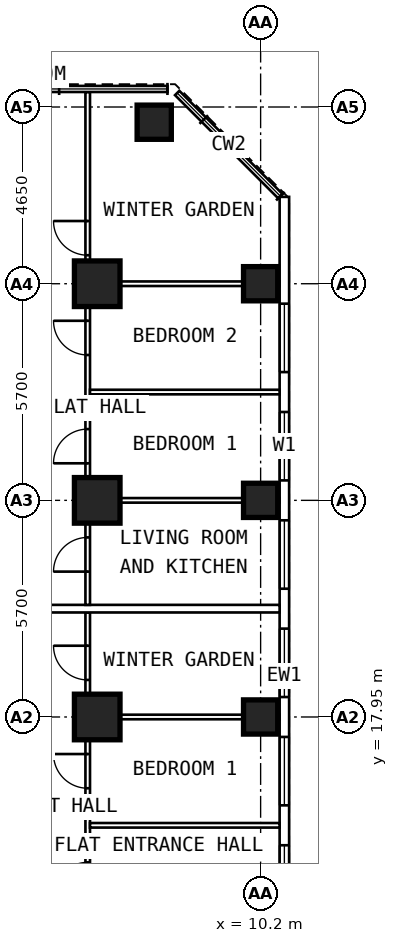
"""IFC4 building model, lengths in metres.
Left out: names, types, materials, properties, quantities, classifications, styles, units other than length and angle.
Written with IfcOpenShell. Run it as: python <this file> out.ifc"""

import sys

from ifc_helpers import new_model, si_unit, direction, frame, frame_2d, origin, origin_2d, place, context, subcontext, project, spatial, rectangle, extrude, element, fill, save


model = new_model("IFC4")
c1 = context("Model", 3, precision=1e-05, world=origin(), true_north=direction((0.0, 1.0)))
c2 = subcontext(c1, "Body", "Model", "MODEL_VIEW")
j1 = project(units=[si_unit("LENGTHUNIT", "METRE"), si_unit("PLANEANGLEUNIT", "RADIAN")], contexts=[c1])
p1 = place(None, origin())
s1 = spatial("IfcSite", under=j1, at=p1, CompositionType="ELEMENT")
p2 = place(p1, origin())
s2 = spatial("IfcBuilding", under=s1, at=p2, CompositionType="ELEMENT")
p3 = place(p2, frame((0.0, 0.0, 80.8)))
s3 = spatial("IfcBuildingStorey", under=s2, at=p3, CompositionType="ELEMENT", Elevation=80.8)
for number, where, z_axis, x_axis in (
    (1, (10.2, 17.95, 0.0), (0.0, 0.0, 1.0), (0.0, 1.0, 0.0)),
    (2, (10.2, 23.65, 0.0), (0.0, 0.0, 1.0), (0.0, 1.0, 0.0)),
    (3, (10.2, 29.35, 0.0), (0.0, 0.0, 1.0), (0.0, 1.0, 0.0)),
    (4, (7.4, 33.6, 0.0), (0.0, 0.0, 1.0), (0.0, 1.0, 0.0)),
):
    element("IfcColumn", number, at=place(p3, frame(where, z_axis=z_axis, x_axis=x_axis)), inside=s3, PredefinedType="COLUMN", context=c2, shape_type="SweptSolid", body=[
        extrude(rectangle(XDim=0.9, YDim=0.9, at=origin_2d()), origin(), (0.0, 0.0, 1.0), 3.6),
    ])
for number, where, z_axis, x_axis in (
    (5, (5.9, 17.95, 0.0), (0.0, 0.0, 1.0), (0.0, 1.0, 0.0)),
    (6, (5.9, 23.65, 0.0), (0.0, 0.0, 1.0), (0.0, 1.0, 0.0)),
    (7, (5.9, 29.35, 0.0), (0.0, 0.0, 1.0), (0.0, 1.0, 0.0)),
):
    element("IfcColumn", number, at=place(p3, frame(where, z_axis=z_axis, x_axis=x_axis)), inside=s3, PredefinedType="COLUMN", context=c2, shape_type="SweptSolid", body=[
        extrude(rectangle(XDim=1.2, YDim=1.2, at=origin_2d()), origin(), (0.0, 0.0, 1.0), 3.6),
    ])
p4 = place(p3, frame((10.825, 6.409, 0.0), z_axis=(0.0, 0.0, 1.0), x_axis=(0.0, 1.0, 0.0)))
e8 = element("IfcWall", 8, at=p4, inside=s3, PredefinedType="SOLIDWALL", context=c2, shape_type="SweptSolid", body=[
    extrude(rectangle(XDim=25.226, YDim=0.25, at=frame_2d((12.613, 0.0))), origin(), (0.0, 0.0, 1.0), 3.35),
])
p5 = place(p4, frame((0.666, 0.0, 0.8)))
e9 = element("IfcOpeningElement", 9, at=p5, cuts=e8, PredefinedType="OPENING", context=c2, shape_type="SweptSolid", body=[
    extrude(rectangle(XDim=1.8, YDim=1.8, at=frame_2d((0.9, 0.9))), frame((0.0, 0.137, 0.0), z_axis=(0.0, -1.0, 0.0), x_axis=(1.0, 0.0, 0.0)), (0.0, 0.0, 1.0), 0.274),
])
p6 = place(p4, frame((3.516, 0.0, 0.8)))
e10 = element("IfcOpeningElement", 10, at=p6, cuts=e8, PredefinedType="OPENING", context=c2, shape_type="SweptSolid", body=[
    extrude(rectangle(XDim=1.8, YDim=1.8, at=frame_2d((0.9, 0.9))), frame((0.0, 0.137, 0.0), z_axis=(0.0, -1.0, 0.0), x_axis=(1.0, 0.0, 0.0)), (0.0, 0.0, 1.0), 0.274),
])
p7 = place(p4, frame((6.366, 0.0, 0.8)))
e11 = element("IfcOpeningElement", 11, at=p7, cuts=e8, PredefinedType="OPENING", context=c2, shape_type="SweptSolid", body=[
    extrude(rectangle(XDim=1.8, YDim=1.8, at=frame_2d((0.9, 0.9))), frame((0.0, 0.137, 0.0), z_axis=(0.0, -1.0, 0.0), x_axis=(1.0, 0.0, 0.0)), (0.0, 0.0, 1.0), 0.274),
])
p8 = place(p4, frame((9.216, 0.0, 0.8)))
e12 = element("IfcOpeningElement", 12, at=p8, cuts=e8, PredefinedType="OPENING", context=c2, shape_type="SweptSolid", body=[
    extrude(rectangle(XDim=1.8, YDim=1.8, at=frame_2d((0.9, 0.9))), frame((0.0, 0.137, 0.0), z_axis=(0.0, -1.0, 0.0), x_axis=(1.0, 0.0, 0.0)), (0.0, 0.0, 1.0), 0.274),
])
p9 = place(p4, frame((12.066, 0.0, 0.8)))
e13 = element("IfcOpeningElement", 13, at=p9, cuts=e8, PredefinedType="OPENING", context=c2, shape_type="SweptSolid", body=[
    extrude(rectangle(XDim=1.8, YDim=1.8, at=frame_2d((0.9, 0.9))), frame((0.0, 0.137, 0.0), z_axis=(0.0, -1.0, 0.0), x_axis=(1.0, 0.0, 0.0)), (0.0, 0.0, 1.0), 0.274),
])
p10 = place(p4, frame((14.916, 0.0, 0.8)))
e14 = element("IfcOpeningElement", 14, at=p10, cuts=e8, PredefinedType="OPENING", context=c2, shape_type="SweptSolid", body=[
    extrude(rectangle(XDim=1.8, YDim=1.8, at=frame_2d((0.9, 0.9))), frame((0.0, 0.137, 0.0), z_axis=(0.0, -1.0, 0.0), x_axis=(1.0, 0.0, 0.0)), (0.0, 0.0, 1.0), 0.274),
])
p11 = place(p4, frame((17.766, 0.0, 0.8)))
e15 = element("IfcOpeningElement", 15, at=p11, cuts=e8, PredefinedType="OPENING", context=c2, shape_type="SweptSolid", body=[
    extrude(rectangle(XDim=1.8, YDim=1.8, at=frame_2d((0.9, 0.9))), frame((0.0, 0.137, 0.0), z_axis=(0.0, -1.0, 0.0), x_axis=(1.0, 0.0, 0.0)), (0.0, 0.0, 1.0), 0.274),
])
p12 = place(p4, frame((20.616, 0.0, 0.8)))
e16 = element("IfcOpeningElement", 16, at=p12, cuts=e8, PredefinedType="OPENING", context=c2, shape_type="SweptSolid", body=[
    extrude(rectangle(XDim=1.8, YDim=1.8, at=frame_2d((0.9, 0.9))), frame((0.0, 0.137, 0.0), z_axis=(0.0, -1.0, 0.0), x_axis=(1.0, 0.0, 0.0)), (0.0, 0.0, 1.0), 0.274),
])
p13 = place(p3, frame((5.65, 9.6, 0.0), z_axis=(0.0, 0.0, 1.0), x_axis=(0.0, 1.0, 0.0)))
e17 = element("IfcWall", 17, at=p13, inside=s3, PredefinedType="PARTITIONING", context=c2, shape_type="SweptSolid", body=[
    extrude(rectangle(XDim=11.1, YDim=0.12, at=frame_2d((5.55, 0.0))), origin(), (0.0, 0.0, 1.0), 3.35),
])
p14 = place(p13, frame((1.0, 0.0, 0.0)))
e18 = element("IfcOpeningElement", 18, at=p14, cuts=e17, PredefinedType="OPENING", context=c2, shape_type="SweptSolid", body=[
    extrude(rectangle(XDim=0.9, YDim=2.1, at=frame_2d((0.45, 1.05))), frame((0.0, 0.072, 0.0), z_axis=(0.0, -1.0, 0.0), x_axis=(1.0, 0.0, 0.0)), (0.0, 0.0, 1.0), 0.144),
])
p15 = place(p13, frame((3.625, 0.0, 0.0)))
e19 = element("IfcOpeningElement", 19, at=p15, cuts=e17, PredefinedType="OPENING", context=c2, shape_type="SweptSolid", body=[
    extrude(rectangle(XDim=0.9, YDim=2.1, at=frame_2d((0.45, 1.05))), frame((0.0, 0.072, 0.0), z_axis=(0.0, -1.0, 0.0), x_axis=(1.0, 0.0, 0.0)), (0.0, 0.0, 1.0), 0.144),
])
p16 = place(p13, frame((6.475, 0.0, 0.0)))
e20 = element("IfcOpeningElement", 20, at=p16, cuts=e17, PredefinedType="OPENING", context=c2, shape_type="SweptSolid", body=[
    extrude(rectangle(XDim=0.9, YDim=2.1, at=frame_2d((0.45, 1.05))), frame((0.0, 0.072, 0.0), z_axis=(0.0, -1.0, 0.0), x_axis=(1.0, 0.0, 0.0)), (0.0, 0.0, 1.0), 0.144),
])
p17 = place(p13, frame((9.325, 0.0, 0.0)))
e21 = element("IfcOpeningElement", 21, at=p17, cuts=e17, PredefinedType="OPENING", context=c2, shape_type="SweptSolid", body=[
    extrude(rectangle(XDim=0.9, YDim=2.1, at=frame_2d((0.45, 1.05))), frame((0.0, 0.072, 0.0), z_axis=(0.0, -1.0, 0.0), x_axis=(1.0, 0.0, 0.0)), (0.0, 0.0, 1.0), 0.144),
])
p18 = place(p3, frame((5.71, 15.1, 0.0), z_axis=(0.0, 0.0, 1.0), x_axis=(1.0, 0.0, 0.0)))
e22 = element("IfcWall", 22, at=p18, inside=s3, PredefinedType="PARTITIONING", context=c2, shape_type="SweptSolid", body=[
    extrude(rectangle(XDim=4.99, YDim=0.12, at=frame_2d((2.495, 0.0))), origin(), (0.0, 0.0, 1.0), 3.35),
])
p19 = place(p3, frame((5.71, 17.95, 0.0), z_axis=(0.0, 0.0, 1.0), x_axis=(1.0, 0.0, 0.0)))
e23 = element("IfcWall", 23, at=p19, inside=s3, PredefinedType="PARTITIONING", context=c2, shape_type="SweptSolid", body=[
    extrude(rectangle(XDim=4.99, YDim=0.12, at=frame_2d((2.495, 0.0))), origin(), (0.0, 0.0, 1.0), 2.45),
])
p20 = place(p3, frame((5.65, 20.9, 0.0), z_axis=(0.0, 0.0, 1.0), x_axis=(0.0, 1.0, 0.0)))
e24 = element("IfcWall", 24, at=p20, inside=s3, PredefinedType="PARTITIONING", context=c2, shape_type="SweptSolid", body=[
    extrude(rectangle(XDim=13.495, YDim=0.12, at=frame_2d((6.748, 0.0))), origin(), (0.0, 0.0, 1.0), 3.35),
])
p21 = place(p20, frame((0.875, 0.0, 0.0)))
e25 = element("IfcOpeningElement", 25, at=p21, cuts=e24, PredefinedType="OPENING", context=c2, shape_type="SweptSolid", body=[
    extrude(rectangle(XDim=0.9, YDim=2.1, at=frame_2d((0.45, 1.05))), frame((0.0, 0.072, 0.0), z_axis=(0.0, -1.0, 0.0), x_axis=(1.0, 0.0, 0.0)), (0.0, 0.0, 1.0), 0.144),
])
p22 = place(p20, frame((3.725, 0.0, 0.0)))
e26 = element("IfcOpeningElement", 26, at=p22, cuts=e24, PredefinedType="OPENING", context=c2, shape_type="SweptSolid", body=[
    extrude(rectangle(XDim=0.9, YDim=2.1, at=frame_2d((0.45, 1.05))), frame((0.0, 0.072, 0.0), z_axis=(0.0, -1.0, 0.0), x_axis=(1.0, 0.0, 0.0)), (0.0, 0.0, 1.0), 0.144),
])
p23 = place(p20, frame((6.575, 0.0, 0.0)))
e27 = element("IfcOpeningElement", 27, at=p23, cuts=e24, PredefinedType="OPENING", context=c2, shape_type="SweptSolid", body=[
    extrude(rectangle(XDim=0.9, YDim=2.1, at=frame_2d((0.45, 1.05))), frame((0.0, 0.072, 0.0), z_axis=(0.0, -1.0, 0.0), x_axis=(1.0, 0.0, 0.0)), (0.0, 0.0, 1.0), 0.144),
])
p24 = place(p20, frame((9.2, 0.0, 0.0)))
e28 = element("IfcOpeningElement", 28, at=p24, cuts=e24, PredefinedType="OPENING", context=c2, shape_type="SweptSolid", body=[
    extrude(rectangle(XDim=0.9, YDim=2.1, at=frame_2d((0.45, 1.05))), frame((0.0, 0.072, 0.0), z_axis=(0.0, -1.0, 0.0), x_axis=(1.0, 0.0, 0.0)), (0.0, 0.0, 1.0), 0.144),
])
p25 = place(p3, frame((5.71, 23.65, 0.0), z_axis=(0.0, 0.0, 1.0), x_axis=(1.0, 0.0, 0.0)))
e29 = element("IfcWall", 29, at=p25, inside=s3, PredefinedType="PARTITIONING", context=c2, shape_type="SweptSolid", body=[
    extrude(rectangle(XDim=4.99, YDim=0.12, at=frame_2d((2.495, 0.0))), origin(), (0.0, 0.0, 1.0), 2.45),
])
p26 = place(p3, frame((5.71, 26.5, 0.0), z_axis=(0.0, 0.0, 1.0), x_axis=(1.0, 0.0, 0.0)))
e30 = element("IfcWall", 30, at=p26, inside=s3, PredefinedType="PARTITIONING", context=c2, shape_type="SweptSolid", body=[
    extrude(rectangle(XDim=4.99, YDim=0.12, at=frame_2d((2.495, 0.0))), origin(), (0.0, 0.0, 1.0), 3.35),
])
p27 = place(p3, frame((5.71, 29.35, 0.0), z_axis=(0.0, 0.0, 1.0), x_axis=(1.0, 0.0, 0.0)))
e31 = element("IfcWall", 31, at=p27, inside=s3, PredefinedType="PARTITIONING", context=c2, shape_type="SweptSolid", body=[
    extrude(rectangle(XDim=4.99, YDim=0.12, at=frame_2d((2.495, 0.0))), origin(), (0.0, 0.0, 1.0), 2.45),
])
p28 = place(p3, frame((2.1, 20.8, 0.0), z_axis=(0.0, 0.0, 1.0), x_axis=(1.0, 0.0, 0.0)))
e32 = element("IfcWall", 32, at=p28, inside=s3, PredefinedType="PARTITIONING", context=c2, shape_type="SweptSolid", body=[
    extrude(rectangle(XDim=8.6, YDim=0.2, at=frame_2d((4.3, 0.0))), origin(), (0.0, 0.0, 1.0), 3.35),
])
p29 = place(p7, origin())
e33 = element("IfcWindow", 33, at=p29, inside=s3, PartitioningType="SINGLE_PANEL", PredefinedType="WINDOW", context=c2, shape_type="SweptSolid", body=[
    extrude(rectangle(XDim=1.8, YDim=1.8, at=frame_2d((0.9, 0.9))), frame((0.0, 0.03, 0.0), z_axis=(0.0, -1.0, 0.0), x_axis=(1.0, 0.0, 0.0)), (0.0, 0.0, 1.0), 0.06),
])
fill(e11, e33)
p30 = place(p8, origin())
e34 = element("IfcWindow", 34, at=p30, inside=s3, PartitioningType="SINGLE_PANEL", PredefinedType="WINDOW", context=c2, shape_type="SweptSolid", body=[
    extrude(rectangle(XDim=1.8, YDim=1.8, at=frame_2d((0.9, 0.9))), frame((0.0, 0.03, 0.0), z_axis=(0.0, -1.0, 0.0), x_axis=(1.0, 0.0, 0.0)), (0.0, 0.0, 1.0), 0.06),
])
fill(e12, e34)
p31 = place(p9, origin())
e35 = element("IfcWindow", 35, at=p31, inside=s3, PartitioningType="SINGLE_PANEL", PredefinedType="WINDOW", context=c2, shape_type="SweptSolid", body=[
    extrude(rectangle(XDim=1.8, YDim=1.8, at=frame_2d((0.9, 0.9))), frame((0.0, 0.03, 0.0), z_axis=(0.0, -1.0, 0.0), x_axis=(1.0, 0.0, 0.0)), (0.0, 0.0, 1.0), 0.06),
])
fill(e13, e35)
p32 = place(p10, origin())
e36 = element("IfcWindow", 36, at=p32, inside=s3, PartitioningType="SINGLE_PANEL", PredefinedType="WINDOW", context=c2, shape_type="SweptSolid", body=[
    extrude(rectangle(XDim=1.8, YDim=1.8, at=frame_2d((0.9, 0.9))), frame((0.0, 0.03, 0.0), z_axis=(0.0, -1.0, 0.0), x_axis=(1.0, 0.0, 0.0)), (0.0, 0.0, 1.0), 0.06),
])
fill(e14, e36)
p33 = place(p11, origin())
e37 = element("IfcWindow", 37, at=p33, inside=s3, PartitioningType="SINGLE_PANEL", PredefinedType="WINDOW", context=c2, shape_type="SweptSolid", body=[
    extrude(rectangle(XDim=1.8, YDim=1.8, at=frame_2d((0.9, 0.9))), frame((0.0, 0.03, 0.0), z_axis=(0.0, -1.0, 0.0), x_axis=(1.0, 0.0, 0.0)), (0.0, 0.0, 1.0), 0.06),
])
fill(e15, e37)
p34 = place(p12, origin())
e38 = element("IfcWindow", 38, at=p34, inside=s3, PartitioningType="SINGLE_PANEL", PredefinedType="WINDOW", context=c2, shape_type="SweptSolid", body=[
    extrude(rectangle(XDim=1.8, YDim=1.8, at=frame_2d((0.9, 0.9))), frame((0.0, 0.03, 0.0), z_axis=(0.0, -1.0, 0.0), x_axis=(1.0, 0.0, 0.0)), (0.0, 0.0, 1.0), 0.06),
])
fill(e16, e38)
p35 = place(p15, origin())
e39 = element("IfcDoor", 39, at=p35, inside=s3, OperationType="SINGLE_SWING_LEFT", PredefinedType="DOOR", context=c2, shape_type="SweptSolid", body=[
    extrude(rectangle(XDim=0.9, YDim=2.1, at=frame_2d((0.45, 1.05))), frame((0.0, 0.025, 0.0), z_axis=(0.0, -1.0, 0.0), x_axis=(1.0, 0.0, 0.0)), (0.0, 0.0, 1.0), 0.05),
])
fill(e19, e39)
p36 = place(p16, origin())
e40 = element("IfcDoor", 40, at=p36, inside=s3, OperationType="SINGLE_SWING_RIGHT", PredefinedType="DOOR", context=c2, shape_type="SweptSolid", body=[
    extrude(rectangle(XDim=0.9, YDim=2.1, at=frame_2d((0.45, 1.05))), frame((0.0, 0.025, 0.0), z_axis=(0.0, -1.0, 0.0), x_axis=(1.0, 0.0, 0.0)), (0.0, 0.0, 1.0), 0.05),
])
fill(e20, e40)
p37 = place(p17, origin())
e41 = element("IfcDoor", 41, at=p37, inside=s3, OperationType="SINGLE_SWING_RIGHT", PredefinedType="DOOR", context=c2, shape_type="SweptSolid", body=[
    extrude(rectangle(XDim=0.9, YDim=2.1, at=frame_2d((0.45, 1.05))), frame((0.0, 0.025, 0.0), z_axis=(0.0, -1.0, 0.0), x_axis=(1.0, 0.0, 0.0)), (0.0, 0.0, 1.0), 0.05),
])
fill(e21, e41)
p38 = place(p21, origin())
e42 = element("IfcDoor", 42, at=p38, inside=s3, OperationType="SINGLE_SWING_LEFT", PredefinedType="DOOR", context=c2, shape_type="SweptSolid", body=[
    extrude(rectangle(XDim=0.9, YDim=2.1, at=frame_2d((0.45, 1.05))), frame((0.0, 0.025, 0.0), z_axis=(0.0, -1.0, 0.0), x_axis=(1.0, 0.0, 0.0)), (0.0, 0.0, 1.0), 0.05),
])
fill(e25, e42)
p39 = place(p22, origin())
e43 = element("IfcDoor", 43, at=p39, inside=s3, OperationType="SINGLE_SWING_LEFT", PredefinedType="DOOR", context=c2, shape_type="SweptSolid", body=[
    extrude(rectangle(XDim=0.9, YDim=2.1, at=frame_2d((0.45, 1.05))), frame((0.0, 0.025, 0.0), z_axis=(0.0, -1.0, 0.0), x_axis=(1.0, 0.0, 0.0)), (0.0, 0.0, 1.0), 0.05),
])
fill(e26, e43)
p40 = place(p23, origin())
e44 = element("IfcDoor", 44, at=p40, inside=s3, OperationType="SINGLE_SWING_RIGHT", PredefinedType="DOOR", context=c2, shape_type="SweptSolid", body=[
    extrude(rectangle(XDim=0.9, YDim=2.1, at=frame_2d((0.45, 1.05))), frame((0.0, 0.025, 0.0), z_axis=(0.0, -1.0, 0.0), x_axis=(1.0, 0.0, 0.0)), (0.0, 0.0, 1.0), 0.05),
])
fill(e27, e44)
p41 = place(p24, origin())
e45 = element("IfcDoor", 45, at=p41, inside=s3, OperationType="SINGLE_SWING_RIGHT", PredefinedType="DOOR", context=c2, shape_type="SweptSolid", body=[
    extrude(rectangle(XDim=0.9, YDim=2.1, at=frame_2d((0.45, 1.05))), frame((0.0, 0.025, 0.0), z_axis=(0.0, -1.0, 0.0), x_axis=(1.0, 0.0, 0.0)), (0.0, 0.0, 1.0), 0.05),
])
fill(e28, e45)
save(model, sys.argv[1])
